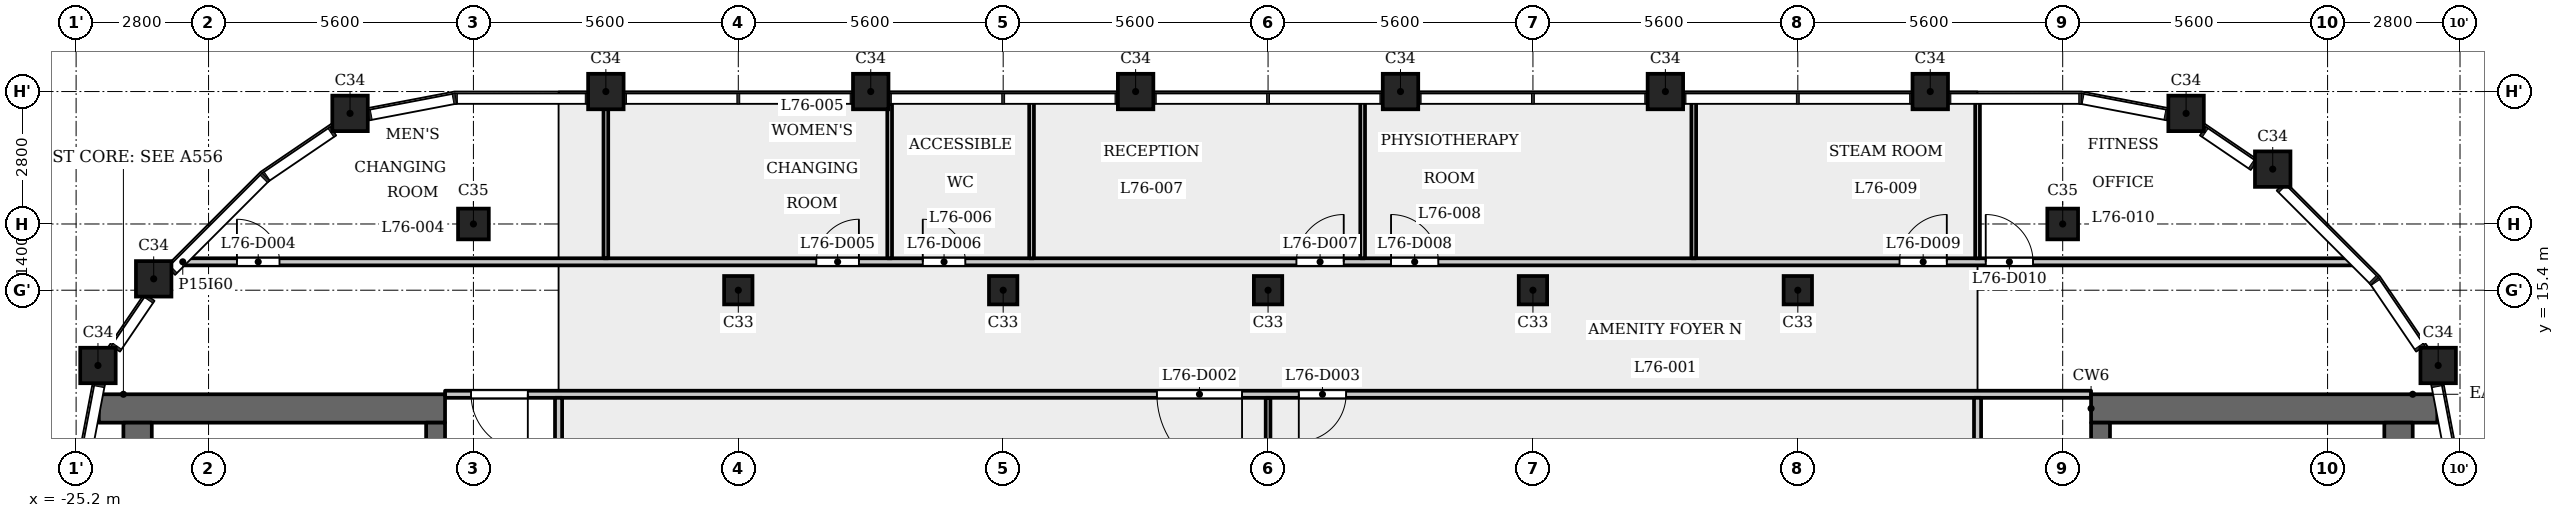
"""IFC4 building model, lengths in metres.
Left out: names, types, materials, properties, quantities, classifications, styles, units other than length and angle.
Written with IfcOpenShell. Run it as: python <this file> out.ifc"""

import sys

from ifc_helpers import new_model, si_unit, direction, frame, frame_2d, origin, origin_2d, place, context, subcontext, project, spatial, rectangle, extrude, element, fill, save


model = new_model("IFC4")
c1 = context("Model", 3, precision=1e-05, world=origin(), true_north=direction((0.0, 1.0)))
c2 = subcontext(c1, "Body", "Model", "MODEL_VIEW")
j1 = project(units=[si_unit("LENGTHUNIT", "METRE"), si_unit("PLANEANGLEUNIT", "RADIAN")], contexts=[c1])
p1 = place(None, origin())
s1 = spatial("IfcSite", under=j1, at=p1, CompositionType="ELEMENT")
p2 = place(p1, origin())
s2 = spatial("IfcBuilding", under=s1, at=p2, CompositionType="ELEMENT")
p3 = place(p2, frame((0.0, 0.0, 294.5)))
s3 = spatial("IfcBuildingStorey", under=s2, at=p3, CompositionType="ELEMENT", Elevation=294.5)
for number, where, z_axis, x_axis in (
    (1, (24.738, 13.809, 0.0), (0.0, 0.0, 1.0), (1.0, 0.0, 0.0)),
    (2, (21.24, 17.96, 0.0), (0.0, 0.0, 1.0), (1.0, 0.0, 0.0)),
    (3, (19.409, 19.138, 0.0), (0.0, 0.0, 1.0), (1.0, 0.0, 0.0)),
    (4, (14.0, 19.6, 0.0), (0.0, 0.0, 1.0), (1.0, 0.0, 0.0)),
    (5, (8.4, 19.6, 0.0), (0.0, 0.0, 1.0), (1.0, 0.0, 0.0)),
    (6, (2.8, 19.6, 0.0), (0.0, 0.0, 1.0), (1.0, 0.0, 0.0)),
    (7, (-2.8, 19.6, 0.0), (0.0, 0.0, 1.0), (1.0, 0.0, 0.0)),
    (8, (-8.4, 19.6, 0.0), (0.0, 0.0, 1.0), (1.0, 0.0, 0.0)),
    (9, (-14.0, 19.6, 0.0), (0.0, 0.0, 1.0), (1.0, 0.0, 0.0)),
    (10, (-19.409, 19.138, 0.0), (0.0, 0.0, 1.0), (1.0, 0.0, 0.0)),
    (11, (-23.56, 15.64, 0.0), (0.0, 0.0, 1.0), (1.0, 0.0, 0.0)),
    (12, (-24.738, 13.809, 0.0), (0.0, 0.0, 1.0), (1.0, 0.0, 0.0)),
):
    element("IfcColumn", number, at=place(p3, frame(where, z_axis=z_axis, x_axis=x_axis)), inside=s3, PredefinedType="COLUMN", context=c2, shape_type="SweptSolid", body=[
        extrude(rectangle(XDim=0.75, YDim=0.75, at=origin_2d()), origin(), (0.0, 0.0, 1.0), 5.4),
    ])
for number, where, z_axis, x_axis in (
    (13, (-16.8, 16.8, 0.0), (0.0, 0.0, 1.0), (1.0, 0.0, 0.0)),
    (14, (16.8, 16.8, 0.0), (0.0, 0.0, 1.0), (1.0, 0.0, 0.0)),
):
    element("IfcColumn", number, at=place(p3, frame(where, z_axis=z_axis, x_axis=x_axis)), inside=s3, PredefinedType="COLUMN", context=c2, shape_type="SweptSolid", body=[
        extrude(rectangle(XDim=0.65, YDim=0.65, at=origin_2d()), origin(), (0.0, 0.0, 1.0), 5.4),
    ])
for number, where, z_axis, x_axis in (
    (15, (-11.2, 15.4, 0.0), (0.0, 0.0, 1.0), (1.0, 0.0, 0.0)),
    (16, (-5.6, 15.4, 0.0), (0.0, 0.0, 1.0), (1.0, 0.0, 0.0)),
    (17, (0.0, 15.4, 0.0), (0.0, 0.0, 1.0), (1.0, 0.0, 0.0)),
    (18, (5.6, 15.4, 0.0), (0.0, 0.0, 1.0), (1.0, 0.0, 0.0)),
    (19, (11.2, 15.4, 0.0), (0.0, 0.0, 1.0), (1.0, 0.0, 0.0)),
):
    element("IfcColumn", number, at=place(p3, frame(where, z_axis=z_axis, x_axis=x_axis)), inside=s3, PredefinedType="COLUMN", context=c2, shape_type="SweptSolid", body=[
        extrude(rectangle(XDim=0.6, YDim=0.6, at=origin_2d()), origin(), (0.0, 0.0, 1.0), 5.4),
    ])
p4 = place(p3, frame((-17.4, 12.9, 0.0), z_axis=(0.0, 0.0, 1.0), x_axis=(-1.0, 0.0, 0.0)))
e20 = element("IfcWall", 20, at=p4, inside=s3, PredefinedType="SHEAR", context=c2, shape_type="SweptSolid", body=[
    extrude(rectangle(XDim=7.32, YDim=0.6, at=frame_2d((3.66, 0.0))), origin(), (0.0, 0.0, 1.0), 4.6),
])
p5 = place(p3, frame((-17.6, -12.6, 0.0), z_axis=(0.0, 0.0, 1.0), x_axis=(0.0, 1.0, 0.0)))
e21 = element("IfcWall", 21, at=p5, inside=s3, PredefinedType="SHEAR", context=c2, shape_type="SweptSolid", body=[
    extrude(rectangle(XDim=25.2, YDim=0.4, at=frame_2d((12.6, 0.0))), origin(), (0.0, 0.0, 1.0), 4.6),
])
p6 = place(p5, frame((6.3, 0.0, 0.0)))
e22 = element("IfcOpeningElement", 22, at=p6, cuts=e21, PredefinedType="OPENING", context=c2, shape_type="SweptSolid", body=[
    extrude(rectangle(XDim=1.1, YDim=2.1, at=frame_2d((0.55, 1.05))), frame((0.0, 0.21, 0.0), z_axis=(0.0, -1.0, 0.0), x_axis=(1.0, 0.0, 0.0)), (0.0, 0.0, 1.0), 0.42),
])
p7 = place(p5, frame((8.7, 0.0, 0.0)))
e23 = element("IfcOpeningElement", 23, at=p7, cuts=e21, PredefinedType="OPENING", context=c2, shape_type="SweptSolid", body=[
    extrude(rectangle(XDim=1.1, YDim=2.1, at=frame_2d((0.55, 1.05))), frame((0.0, 0.21, 0.0), z_axis=(0.0, -1.0, 0.0), x_axis=(1.0, 0.0, 0.0)), (0.0, 0.0, 1.0), 0.42),
])
p8 = place(p5, frame((11.2, 0.0, 0.0)))
e24 = element("IfcOpeningElement", 24, at=p8, cuts=e21, PredefinedType="OPENING", context=c2, shape_type="SweptSolid", body=[
    extrude(rectangle(XDim=0.9, YDim=2.1, at=frame_2d((0.45, 1.05))), frame((0.0, 0.21, 0.0), z_axis=(0.0, -1.0, 0.0), x_axis=(1.0, 0.0, 0.0)), (0.0, 0.0, 1.0), 0.42),
])
p9 = place(p5, frame((17.05, 0.0, 0.0)))
e25 = element("IfcOpeningElement", 25, at=p9, cuts=e21, PredefinedType="OPENING", context=c2, shape_type="SweptSolid", body=[
    extrude(rectangle(XDim=0.9, YDim=2.1, at=frame_2d((0.45, 1.05))), frame((0.0, 0.21, 0.0), z_axis=(0.0, -1.0, 0.0), x_axis=(1.0, 0.0, 0.0)), (0.0, 0.0, 1.0), 0.42),
])
p10 = place(p5, frame((23.25, 0.0, 0.0)))
e26 = element("IfcOpeningElement", 26, at=p10, cuts=e21, PredefinedType="OPENING", context=c2, shape_type="SweptSolid", body=[
    extrude(rectangle(XDim=1.1, YDim=2.1, at=frame_2d((0.55, 1.05))), frame((0.0, 0.21, 0.0), z_axis=(0.0, -1.0, 0.0), x_axis=(1.0, 0.0, 0.0)), (0.0, 0.0, 1.0), 0.42),
])
p11 = place(p5, frame((0.85, 0.0, 0.0)))
e27 = element("IfcOpeningElement", 27, at=p11, cuts=e21, PredefinedType="OPENING", context=c2, shape_type="SweptSolid", body=[
    extrude(rectangle(XDim=1.1, YDim=2.1, at=frame_2d((0.55, 1.05))), frame((0.0, 0.21, 0.0), z_axis=(0.0, -1.0, 0.0), x_axis=(1.0, 0.0, 0.0)), (0.0, 0.0, 1.0), 0.42),
])
p12 = place(p5, frame((13.075, 0.0, 0.0)))
e28 = element("IfcOpeningElement", 28, at=p12, cuts=e21, PredefinedType="OPENING", context=c2, shape_type="SweptSolid", body=[
    extrude(rectangle(XDim=1.8, YDim=2.1, at=frame_2d((0.9, 1.05))), frame((0.0, 0.21, 0.0), z_axis=(0.0, -1.0, 0.0), x_axis=(1.0, 0.0, 0.0)), (0.0, 0.0, 1.0), 0.42),
])
p13 = place(p3, frame((-23.9, -12.6, 0.0), z_axis=(0.0, 0.0, 1.0), x_axis=(0.0, 1.0, 0.0)))
e29 = element("IfcWall", 29, at=p13, inside=s3, PredefinedType="SHEAR", context=c2, shape_type="SweptSolid", body=[
    extrude(rectangle(XDim=25.2, YDim=0.6, at=frame_2d((12.6, 0.0))), origin(), (0.0, 0.0, 1.0), 4.6),
])
p14 = place(p3, frame((17.4, 12.9, 0.0), z_axis=(0.0, 0.0, 1.0), x_axis=(1.0, 0.0, 0.0)))
e30 = element("IfcWall", 30, at=p14, inside=s3, PredefinedType="SHEAR", context=c2, shape_type="SweptSolid", body=[
    extrude(rectangle(XDim=7.32, YDim=0.6, at=frame_2d((3.66, 0.0))), origin(), (0.0, 0.0, 1.0), 4.6),
])
p15 = place(p3, frame((17.6, -12.6, 0.0), z_axis=(0.0, 0.0, 1.0), x_axis=(0.0, 1.0, 0.0)))
e31 = element("IfcWall", 31, at=p15, inside=s3, PredefinedType="SHEAR", context=c2, shape_type="SweptSolid", body=[
    extrude(rectangle(XDim=25.2, YDim=0.4, at=frame_2d((12.6, 0.0))), origin(), (0.0, 0.0, 1.0), 4.6),
])
p16 = place(p15, frame((6.3, 0.0, 0.0)))
e32 = element("IfcOpeningElement", 32, at=p16, cuts=e31, PredefinedType="OPENING", context=c2, shape_type="SweptSolid", body=[
    extrude(rectangle(XDim=1.1, YDim=2.1, at=frame_2d((0.55, 1.05))), frame((0.0, 0.21, 0.0), z_axis=(0.0, -1.0, 0.0), x_axis=(1.0, 0.0, 0.0)), (0.0, 0.0, 1.0), 0.42),
])
p17 = place(p15, frame((8.7, 0.0, 0.0)))
e33 = element("IfcOpeningElement", 33, at=p17, cuts=e31, PredefinedType="OPENING", context=c2, shape_type="SweptSolid", body=[
    extrude(rectangle(XDim=1.1, YDim=2.1, at=frame_2d((0.55, 1.05))), frame((0.0, 0.21, 0.0), z_axis=(0.0, -1.0, 0.0), x_axis=(1.0, 0.0, 0.0)), (0.0, 0.0, 1.0), 0.42),
])
p18 = place(p15, frame((11.2, 0.0, 0.0)))
e34 = element("IfcOpeningElement", 34, at=p18, cuts=e31, PredefinedType="OPENING", context=c2, shape_type="SweptSolid", body=[
    extrude(rectangle(XDim=0.9, YDim=2.1, at=frame_2d((0.45, 1.05))), frame((0.0, 0.21, 0.0), z_axis=(0.0, -1.0, 0.0), x_axis=(1.0, 0.0, 0.0)), (0.0, 0.0, 1.0), 0.42),
])
p19 = place(p15, frame((17.05, 0.0, 0.0)))
e35 = element("IfcOpeningElement", 35, at=p19, cuts=e31, PredefinedType="OPENING", context=c2, shape_type="SweptSolid", body=[
    extrude(rectangle(XDim=0.9, YDim=2.1, at=frame_2d((0.45, 1.05))), frame((0.0, 0.21, 0.0), z_axis=(0.0, -1.0, 0.0), x_axis=(1.0, 0.0, 0.0)), (0.0, 0.0, 1.0), 0.42),
])
p20 = place(p15, frame((23.25, 0.0, 0.0)))
e36 = element("IfcOpeningElement", 36, at=p20, cuts=e31, PredefinedType="OPENING", context=c2, shape_type="SweptSolid", body=[
    extrude(rectangle(XDim=1.1, YDim=2.1, at=frame_2d((0.55, 1.05))), frame((0.0, 0.21, 0.0), z_axis=(0.0, -1.0, 0.0), x_axis=(1.0, 0.0, 0.0)), (0.0, 0.0, 1.0), 0.42),
])
p21 = place(p15, frame((0.85, 0.0, 0.0)))
e37 = element("IfcOpeningElement", 37, at=p21, cuts=e31, PredefinedType="OPENING", context=c2, shape_type="SweptSolid", body=[
    extrude(rectangle(XDim=1.1, YDim=2.1, at=frame_2d((0.55, 1.05))), frame((0.0, 0.21, 0.0), z_axis=(0.0, -1.0, 0.0), x_axis=(1.0, 0.0, 0.0)), (0.0, 0.0, 1.0), 0.42),
])
p22 = place(p15, frame((13.075, 0.0, 0.0)))
e38 = element("IfcOpeningElement", 38, at=p22, cuts=e31, PredefinedType="OPENING", context=c2, shape_type="SweptSolid", body=[
    extrude(rectangle(XDim=1.8, YDim=2.1, at=frame_2d((0.9, 1.05))), frame((0.0, 0.21, 0.0), z_axis=(0.0, -1.0, 0.0), x_axis=(1.0, 0.0, 0.0)), (0.0, 0.0, 1.0), 0.42),
])
p23 = place(p3, frame((23.9, -12.6, 0.0), z_axis=(0.0, 0.0, 1.0), x_axis=(0.0, 1.0, 0.0)))
e39 = element("IfcWall", 39, at=p23, inside=s3, PredefinedType="SHEAR", context=c2, shape_type="SweptSolid", body=[
    extrude(rectangle(XDim=25.2, YDim=0.6, at=frame_2d((12.6, 0.0))), origin(), (0.0, 0.0, 1.0), 4.6),
])
p24 = place(p3, frame((-17.4, 13.2, 0.0), z_axis=(0.0, 0.0, 1.0), x_axis=(1.0, 0.0, 0.0)))
e40 = element("IfcWall", 40, at=p24, inside=s3, PredefinedType="PARTITIONING", context=c2, shape_type="SweptSolid", body=[
    extrude(rectangle(XDim=34.8, YDim=0.15, at=frame_2d((17.4, 0.0))), origin(), (0.0, 0.0, 1.0), 4.6),
])
p25 = place(p24, frame((0.55, 0.0, 0.0)))
e41 = element("IfcOpeningElement", 41, at=p25, cuts=e40, PredefinedType="OPENING", context=c2, shape_type="SweptSolid", body=[
    extrude(rectangle(XDim=1.2, YDim=2.1, at=frame_2d((0.6, 1.05))), frame((0.0, 0.085, 0.0), z_axis=(0.0, -1.0, 0.0), x_axis=(1.0, 0.0, 0.0)), (0.0, 0.0, 1.0), 0.17),
])
p26 = place(p24, frame((15.05, 0.0, 0.0)))
e42 = element("IfcOpeningElement", 42, at=p26, cuts=e40, PredefinedType="OPENING", context=c2, shape_type="SweptSolid", body=[
    extrude(rectangle(XDim=1.8, YDim=2.1, at=frame_2d((0.9, 1.05))), frame((0.0, 0.085, 0.0), z_axis=(0.0, -1.0, 0.0), x_axis=(1.0, 0.0, 0.0)), (0.0, 0.0, 1.0), 0.17),
])
p27 = place(p24, frame((18.05, 0.0, 0.0)))
e43 = element("IfcOpeningElement", 43, at=p27, cuts=e40, PredefinedType="OPENING", context=c2, shape_type="SweptSolid", body=[
    extrude(rectangle(XDim=1.0, YDim=2.1, at=frame_2d((0.5, 1.05))), frame((0.0, 0.085, 0.0), z_axis=(0.0, -1.0, 0.0), x_axis=(1.0, 0.0, 0.0)), (0.0, 0.0, 1.0), 0.17),
])
p28 = place(p3, frame((-22.945, 16.0, 0.0), z_axis=(0.0, 0.0, 1.0), x_axis=(1.0, 0.0, 0.0)))
e44 = element("IfcWall", 44, at=p28, inside=s3, PredefinedType="PARTITIONING", context=c2, shape_type="SweptSolid", body=[
    extrude(rectangle(XDim=45.891, YDim=0.15, at=frame_2d((22.945, 0.0))), origin(), (0.0, 0.0, 1.0), 4.6),
])
p29 = place(p28, frame((1.145, 0.0, 0.0)))
e45 = element("IfcOpeningElement", 45, at=p29, cuts=e44, PredefinedType="OPENING", context=c2, shape_type="SweptSolid", body=[
    extrude(rectangle(XDim=0.9, YDim=2.1, at=frame_2d((0.45, 1.05))), frame((0.0, 0.085, 0.0), z_axis=(0.0, -1.0, 0.0), x_axis=(1.0, 0.0, 0.0)), (0.0, 0.0, 1.0), 0.17),
])
p30 = place(p28, frame((13.395, 0.0, 0.0)))
e46 = element("IfcOpeningElement", 46, at=p30, cuts=e44, PredefinedType="OPENING", context=c2, shape_type="SweptSolid", body=[
    extrude(rectangle(XDim=0.9, YDim=2.1, at=frame_2d((0.45, 1.05))), frame((0.0, 0.085, 0.0), z_axis=(0.0, -1.0, 0.0), x_axis=(1.0, 0.0, 0.0)), (0.0, 0.0, 1.0), 0.17),
])
p31 = place(p28, frame((15.645, 0.0, 0.0)))
e47 = element("IfcOpeningElement", 47, at=p31, cuts=e44, PredefinedType="OPENING", context=c2, shape_type="SweptSolid", body=[
    extrude(rectangle(XDim=0.9, YDim=2.1, at=frame_2d((0.45, 1.05))), frame((0.0, 0.085, 0.0), z_axis=(0.0, -1.0, 0.0), x_axis=(1.0, 0.0, 0.0)), (0.0, 0.0, 1.0), 0.17),
])
p32 = place(p28, frame((23.545, 0.0, 0.0)))
e48 = element("IfcOpeningElement", 48, at=p32, cuts=e44, PredefinedType="OPENING", context=c2, shape_type="SweptSolid", body=[
    extrude(rectangle(XDim=1.0, YDim=2.1, at=frame_2d((0.5, 1.05))), frame((0.0, 0.085, 0.0), z_axis=(0.0, -1.0, 0.0), x_axis=(1.0, 0.0, 0.0)), (0.0, 0.0, 1.0), 0.17),
])
p33 = place(p28, frame((25.545, 0.0, 0.0)))
e49 = element("IfcOpeningElement", 49, at=p33, cuts=e44, PredefinedType="OPENING", context=c2, shape_type="SweptSolid", body=[
    extrude(rectangle(XDim=1.0, YDim=2.1, at=frame_2d((0.5, 1.05))), frame((0.0, 0.085, 0.0), z_axis=(0.0, -1.0, 0.0), x_axis=(1.0, 0.0, 0.0)), (0.0, 0.0, 1.0), 0.17),
])
p34 = place(p28, frame((36.295, 0.0, 0.0)))
e50 = element("IfcOpeningElement", 50, at=p34, cuts=e44, PredefinedType="OPENING", context=c2, shape_type="SweptSolid", body=[
    extrude(rectangle(XDim=1.0, YDim=2.1, at=frame_2d((0.5, 1.05))), frame((0.0, 0.085, 0.0), z_axis=(0.0, -1.0, 0.0), x_axis=(1.0, 0.0, 0.0)), (0.0, 0.0, 1.0), 0.17),
])
p35 = place(p28, frame((38.118, 0.0, 0.0)))
e51 = element("IfcOpeningElement", 51, at=p35, cuts=e44, PredefinedType="OPENING", context=c2, shape_type="SweptSolid", body=[
    extrude(rectangle(XDim=1.0, YDim=2.1, at=frame_2d((0.5, 1.05))), frame((0.0, 0.085, 0.0), z_axis=(0.0, -1.0, 0.0), x_axis=(1.0, 0.0, 0.0)), (0.0, 0.0, 1.0), 0.17),
])
p36 = place(p3, frame((-15.0, 6.769, 0.0), z_axis=(0.0, 0.0, 1.0), x_axis=(0.0, 1.0, 0.0)))
e52 = element("IfcWall", 52, at=p36, inside=s3, PredefinedType="PARTITIONING", context=c2, shape_type="SweptSolid", body=[
    extrude(rectangle(XDim=6.356, YDim=0.15, at=frame_2d((3.178, 0.0))), origin(), (0.0, 0.0, 1.0), 4.6),
])
p37 = place(p3, frame((-14.0, 16.075, 0.0), z_axis=(0.0, 0.0, 1.0), x_axis=(0.0, 1.0, 0.0)))
e53 = element("IfcWall", 53, at=p37, inside=s3, PredefinedType="PARTITIONING", context=c2, shape_type="SweptSolid", body=[
    extrude(rectangle(XDim=3.88, YDim=0.1, at=frame_2d((1.94, 0.0))), origin(), (0.0, 0.0, 1.0), 4.6),
])
p38 = place(p3, frame((-8.0, 16.075, 0.0), z_axis=(0.0, 0.0, 1.0), x_axis=(0.0, 1.0, 0.0)))
e54 = element("IfcWall", 54, at=p38, inside=s3, PredefinedType="PARTITIONING", context=c2, shape_type="SweptSolid", body=[
    extrude(rectangle(XDim=3.275, YDim=0.1, at=frame_2d((1.638, 0.0))), origin(), (0.0, 0.0, 1.0), 4.6),
])
p39 = place(p3, frame((-5.0, 16.075, 0.0), z_axis=(0.0, 0.0, 1.0), x_axis=(0.0, 1.0, 0.0)))
e55 = element("IfcWall", 55, at=p39, inside=s3, PredefinedType="PARTITIONING", context=c2, shape_type="SweptSolid", body=[
    extrude(rectangle(XDim=3.339, YDim=0.1, at=frame_2d((1.669, 0.0))), origin(), (0.0, 0.0, 1.0), 4.6),
])
p40 = place(p3, frame((0.0, 7.25, 0.0), z_axis=(0.0, 0.0, 1.0), x_axis=(0.0, 1.0, 0.0)))
e56 = element("IfcWall", 56, at=p40, inside=s3, PredefinedType="PARTITIONING", context=c2, shape_type="SweptSolid", body=[
    extrude(rectangle(XDim=5.875, YDim=0.1, at=frame_2d((2.938, 0.0))), origin(), (0.0, 0.0, 1.0), 4.6),
])
for number, where, z_axis, x_axis in (
    (57, (2.0, 16.075, 0.0), (0.0, 0.0, 1.0), (0.0, 1.0, 0.0)),
    (58, (9.0, 16.075, 0.0), (0.0, 0.0, 1.0), (0.0, 1.0, 0.0)),
    (59, (15.0, 16.075, 0.0), (0.0, 0.0, 1.0), (0.0, 1.0, 0.0)),
):
    element("IfcWall", number, at=place(p3, frame(where, z_axis=z_axis, x_axis=x_axis)), inside=s3, PredefinedType="PARTITIONING", context=c2, shape_type="SweptSolid", body=[
        extrude(rectangle(XDim=3.339, YDim=0.1, at=frame_2d((1.669, 0.0))), origin(), (0.0, 0.0, 1.0), 4.6),
    ])
p41 = place(p3, frame((15.0, 6.769, 0.0), z_axis=(0.0, 0.0, 1.0), x_axis=(0.0, 1.0, 0.0)))
e60 = element("IfcWall", 60, at=p41, inside=s3, PredefinedType="PARTITIONING", context=c2, shape_type="SweptSolid", body=[
    extrude(rectangle(XDim=6.356, YDim=0.15, at=frame_2d((3.178, 0.0))), origin(), (0.0, 0.0, 1.0), 4.6),
])
p42 = place(p25, origin())
e61 = element("IfcDoor", 61, at=p42, inside=s3, OperationType="SINGLE_SWING_RIGHT", PredefinedType="DOOR", context=c2, shape_type="SweptSolid", body=[
    extrude(rectangle(XDim=1.2, YDim=2.1, at=frame_2d((0.6, 1.05))), frame((0.0, 0.025, 0.0), z_axis=(0.0, -1.0, 0.0), x_axis=(1.0, 0.0, 0.0)), (0.0, 0.0, 1.0), 0.05),
])
fill(e41, e61)
p43 = place(p26, origin())
e62 = element("IfcDoor", 62, at=p43, inside=s3, OperationType="SINGLE_SWING_RIGHT", PredefinedType="DOOR", context=c2, shape_type="SweptSolid", body=[
    extrude(rectangle(XDim=1.8, YDim=2.1, at=frame_2d((0.9, 1.05))), frame((0.0, 0.025, 0.0), z_axis=(0.0, -1.0, 0.0), x_axis=(1.0, 0.0, 0.0)), (0.0, 0.0, 1.0), 0.05),
])
fill(e42, e62)
p44 = place(p27, origin())
e63 = element("IfcDoor", 63, at=p44, inside=s3, OperationType="SINGLE_SWING_LEFT", PredefinedType="DOOR", context=c2, shape_type="SweptSolid", body=[
    extrude(rectangle(XDim=1.0, YDim=2.1, at=frame_2d((0.5, 1.05))), frame((0.0, 0.025, 0.0), z_axis=(0.0, -1.0, 0.0), x_axis=(1.0, 0.0, 0.0)), (0.0, 0.0, 1.0), 0.05),
])
fill(e43, e63)
p45 = place(p29, origin())
e64 = element("IfcDoor", 64, at=p45, inside=s3, OperationType="SINGLE_SWING_RIGHT", PredefinedType="DOOR", context=c2, shape_type="SweptSolid", body=[
    extrude(rectangle(XDim=0.9, YDim=2.1, at=frame_2d((0.45, 1.05))), frame((0.0, 0.025, 0.0), z_axis=(0.0, -1.0, 0.0), x_axis=(1.0, 0.0, 0.0)), (0.0, 0.0, 1.0), 0.05),
])
fill(e45, e64)
p46 = place(p30, origin())
e65 = element("IfcDoor", 65, at=p46, inside=s3, OperationType="SINGLE_SWING_LEFT", PredefinedType="DOOR", context=c2, shape_type="SweptSolid", body=[
    extrude(rectangle(XDim=0.9, YDim=2.1, at=frame_2d((0.45, 1.05))), frame((0.0, 0.025, 0.0), z_axis=(0.0, -1.0, 0.0), x_axis=(1.0, 0.0, 0.0)), (0.0, 0.0, 1.0), 0.05),
])
fill(e46, e65)
p47 = place(p31, origin())
e66 = element("IfcDoor", 66, at=p47, inside=s3, OperationType="SINGLE_SWING_RIGHT", PredefinedType="DOOR", context=c2, shape_type="SweptSolid", body=[
    extrude(rectangle(XDim=0.9, YDim=2.1, at=frame_2d((0.45, 1.05))), frame((0.0, 0.025, 0.0), z_axis=(0.0, -1.0, 0.0), x_axis=(1.0, 0.0, 0.0)), (0.0, 0.0, 1.0), 0.05),
])
fill(e47, e66)
p48 = place(p32, origin())
e67 = element("IfcDoor", 67, at=p48, inside=s3, OperationType="SINGLE_SWING_LEFT", PredefinedType="DOOR", context=c2, shape_type="SweptSolid", body=[
    extrude(rectangle(XDim=1.0, YDim=2.1, at=frame_2d((0.5, 1.05))), frame((0.0, 0.025, 0.0), z_axis=(0.0, -1.0, 0.0), x_axis=(1.0, 0.0, 0.0)), (0.0, 0.0, 1.0), 0.05),
])
fill(e48, e67)
p49 = place(p33, origin())
e68 = element("IfcDoor", 68, at=p49, inside=s3, OperationType="SINGLE_SWING_RIGHT", PredefinedType="DOOR", context=c2, shape_type="SweptSolid", body=[
    extrude(rectangle(XDim=1.0, YDim=2.1, at=frame_2d((0.5, 1.05))), frame((0.0, 0.025, 0.0), z_axis=(0.0, -1.0, 0.0), x_axis=(1.0, 0.0, 0.0)), (0.0, 0.0, 1.0), 0.05),
])
fill(e49, e68)
p50 = place(p34, origin())
e69 = element("IfcDoor", 69, at=p50, inside=s3, OperationType="SINGLE_SWING_LEFT", PredefinedType="DOOR", context=c2, shape_type="SweptSolid", body=[
    extrude(rectangle(XDim=1.0, YDim=2.1, at=frame_2d((0.5, 1.05))), frame((0.0, 0.025, 0.0), z_axis=(0.0, -1.0, 0.0), x_axis=(1.0, 0.0, 0.0)), (0.0, 0.0, 1.0), 0.05),
])
fill(e50, e69)
p51 = place(p35, origin())
e70 = element("IfcDoor", 70, at=p51, inside=s3, OperationType="SINGLE_SWING_RIGHT", PredefinedType="DOOR", context=c2, shape_type="SweptSolid", body=[
    extrude(rectangle(XDim=1.0, YDim=2.1, at=frame_2d((0.5, 1.05))), frame((0.0, 0.025, 0.0), z_axis=(0.0, -1.0, 0.0), x_axis=(1.0, 0.0, 0.0)), (0.0, 0.0, 1.0), 0.05),
])
fill(e51, e70)
save(model, sys.argv[1])
